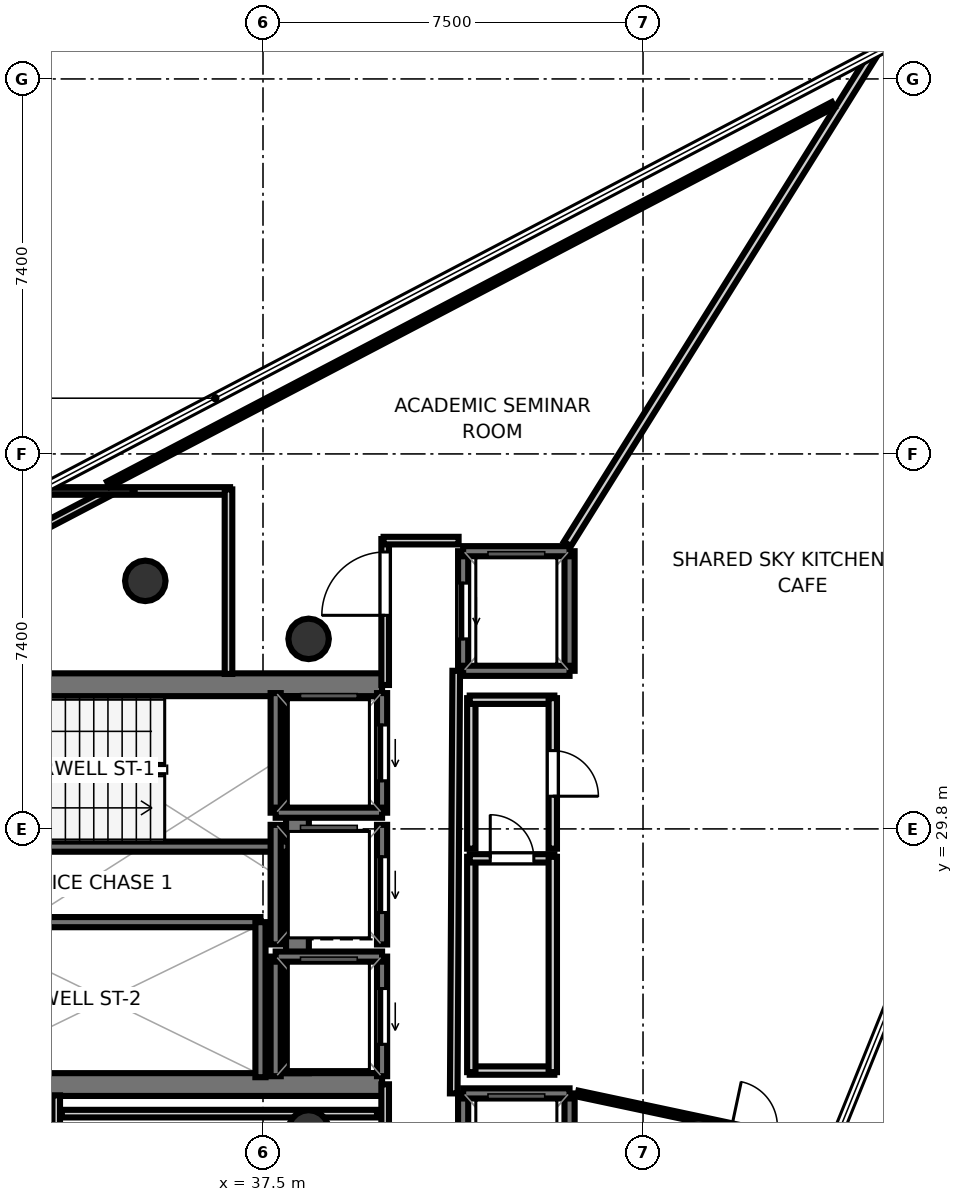
"""IFC4 building model, lengths in metres.
Left out: names, types, materials, properties, quantities, classifications, styles, units other than length and angle.
Written with IfcOpenShell. Run it as: python <this file> out.ifc"""

import sys

from ifc_helpers import new_model, si_unit, direction, frame, frame_2d, origin, origin_2d, place, context, subcontext, project, spatial, rectangle, hollow_circle, extrude, element, fill, save


model = new_model("IFC4")
c1 = context("Model", 3, precision=1e-05, world=origin(), true_north=direction((0.0, 1.0)))
c2 = subcontext(c1, "Body", "Model", "MODEL_VIEW")
j1 = project(units=[si_unit("LENGTHUNIT", "METRE"), si_unit("PLANEANGLEUNIT", "RADIAN")], contexts=[c1])
p1 = place(None, origin())
s1 = spatial("IfcSite", under=j1, at=p1, CompositionType="ELEMENT")
p2 = place(p1, origin())
s2 = spatial("IfcBuilding", under=s1, at=p2, CompositionType="ELEMENT")
p3 = place(p2, frame((0.0, 0.0, 351.8)))
s3 = spatial("IfcBuildingStorey", under=s2, at=p3, CompositionType="ELEMENT", Elevation=351.8)
p4 = place(p3, frame((29.33, 32.645, 0.0), z_axis=(0.0, 0.0, 1.0), x_axis=(1.0, 0.0, 0.0)))
e1 = element("IfcWall", 1, at=p4, inside=s3, PredefinedType="SHEAR", context=c2, shape_type="SweptSolid", body=[
    extrude(rectangle(XDim=10.52, YDim=0.45, at=frame_2d((5.26, 0.0))), origin(), (0.0, 0.0, 1.0), 4.3),
])
p5 = place(p4, frame((0.895, 0.0, 0.0)))
e2 = element("IfcOpeningElement", 2, at=p5, cuts=e1, PredefinedType="OPENING", context=c2, shape_type="SweptSolid", body=[
    extrude(rectangle(XDim=1.25, YDim=2.15, at=frame_2d((0.625, 1.075))), frame((0.0, 0.235, 0.0), z_axis=(0.0, -1.0, 0.0), x_axis=(1.0, 0.0, 0.0)), (0.0, 0.0, 1.0), 0.47),
])
p6 = place(p3, frame((29.33, 24.755, 0.0), z_axis=(0.0, 0.0, 1.0), x_axis=(1.0, 0.0, 0.0)))
e3 = element("IfcWall", 3, at=p6, inside=s3, PredefinedType="SHEAR", context=c2, shape_type="SweptSolid", body=[
    extrude(rectangle(XDim=10.52, YDim=0.45, at=frame_2d((5.26, 0.0))), origin(), (0.0, 0.0, 1.0), 4.3),
])
p7 = place(p6, frame((0.695, 0.0, 0.0)))
e4 = element("IfcOpeningElement", 4, at=p7, cuts=e3, PredefinedType="OPENING", context=c2, shape_type="SweptSolid", body=[
    extrude(rectangle(XDim=1.25, YDim=2.15, at=frame_2d((0.625, 1.075))), frame((0.0, 0.235, 0.0), z_axis=(0.0, -1.0, 0.0), x_axis=(1.0, 0.0, 0.0)), (0.0, 0.0, 1.0), 0.47),
])
p8 = place(p3, frame((38.18, 24.98, 0.0), z_axis=(0.0, 0.0, 1.0), x_axis=(0.0, 1.0, 0.0)))
e5 = element("IfcWall", 5, at=p8, inside=s3, PredefinedType="SHEAR", context=c2, shape_type="SweptSolid", body=[
    extrude(rectangle(XDim=7.44, YDim=0.45, at=frame_2d((3.72, 0.0))), origin(), (0.0, 0.0, 1.0), 4.3),
])
for number, where, z_axis, x_axis in (
    (6, (38.4, 33.55, 0.0), (0.0, 0.0, 1.0), (1.0, 0.0, 0.0)),
    (7, (38.4, 23.85, 0.0), (0.0, 0.0, 1.0), (1.0, 0.0, 0.0)),
    (8, (35.177, 34.695, 0.0), (0.0, 0.0, 1.0), (1.0, 0.0, 0.0)),
    (9, (46.095, 23.691, 0.0), (0.0, 0.0, 1.0), (1.0, 0.0, 0.0)),
):
    element("IfcColumn", number, at=place(p3, frame(where, z_axis=z_axis, x_axis=x_axis)), inside=s3, PredefinedType="COLUMN", context=c2, shape_type="SweptSolid", body=[
        extrude(hollow_circle(Radius=0.4, WallThickness=0.022, at=origin_2d()), origin(), (0.0, 0.0, 1.0), 4.5),
    ])
p9 = place(p3, frame((29.7, 29.45, 0.0), z_axis=(0.0, 0.0, 1.0), x_axis=(1.0, 0.0, 0.0)))
e10 = element("IfcWall", 10, at=p9, inside=s3, PredefinedType="SOLIDWALL", context=c2, shape_type="SweptSolid", body=[
    extrude(rectangle(XDim=8.3, YDim=0.2, at=frame_2d((4.15, 0.0))), origin(), (0.0, 0.0, 1.0), 4.3),
])
p10 = place(p3, frame((29.7, 27.96, 0.0), z_axis=(0.0, 0.0, 1.0), x_axis=(1.0, 0.0, 0.0)))
e11 = element("IfcWall", 11, at=p10, inside=s3, PredefinedType="SOLIDWALL", context=c2, shape_type="SweptSolid", body=[
    extrude(rectangle(XDim=7.75, YDim=0.2, at=frame_2d((3.875, 0.0))), origin(), (0.0, 0.0, 1.0), 4.3),
])
p11 = place(p3, frame((37.45, 24.9, 0.0), z_axis=(0.0, 0.0, 1.0), x_axis=(0.0, 1.0, 0.0)))
e12 = element("IfcWall", 12, at=p11, inside=s3, PredefinedType="SOLIDWALL", context=c2, shape_type="SweptSolid", body=[
    extrude(rectangle(XDim=3.06, YDim=0.2, at=frame_2d((1.53, 0.0))), origin(), (0.0, 0.0, 1.0), 4.3),
])
p12 = place(p3, frame((39.85, 30.12, 0.0), z_axis=(0.0, 0.0, 1.0), x_axis=(0.0, 1.0, 0.0)))
e13 = element("IfcWall", 13, at=p12, inside=s3, PredefinedType="SOLIDWALL", context=c2, shape_type="SweptSolid", body=[
    extrude(rectangle(XDim=2.36, YDim=0.2, at=frame_2d((1.18, 0.0))), origin(), (0.0, 0.0, 1.0), 4.3),
])
p13 = place(p12, frame((0.63, 0.0, 0.0)))
e14 = element("IfcOpeningElement", 14, at=p13, cuts=e13, PredefinedType="OPENING", context=c2, shape_type="SweptSolid", body=[
    extrude(rectangle(XDim=1.1, YDim=2.15, at=frame_2d((0.55, 1.075))), frame((0.0, 0.11, 0.0), z_axis=(0.0, -1.0, 0.0), x_axis=(1.0, 0.0, 0.0)), (0.0, 0.0, 1.0), 0.22),
])
p14 = place(p3, frame((37.75, 30.12, 0.0), z_axis=(0.0, 0.0, 1.0), x_axis=(0.0, 1.0, 0.0)))
e15 = element("IfcWall", 15, at=p14, inside=s3, PredefinedType="SOLIDWALL", context=c2, shape_type="SweptSolid", body=[
    extrude(rectangle(XDim=2.36, YDim=0.2, at=frame_2d((1.18, 0.0))), origin(), (0.0, 0.0, 1.0), 4.3),
])
p15 = place(p3, frame((37.75, 30.12, 0.0), z_axis=(0.0, 0.0, 1.0), x_axis=(1.0, 0.0, 0.0)))
e16 = element("IfcWall", 16, at=p15, inside=s3, PredefinedType="SOLIDWALL", context=c2, shape_type="SweptSolid", body=[
    extrude(rectangle(XDim=2.1, YDim=0.2, at=frame_2d((1.05, 0.0))), origin(), (0.0, 0.0, 1.0), 4.3),
])
p16 = place(p3, frame((39.85, 24.92, 0.0), z_axis=(0.0, 0.0, 1.0), x_axis=(0.0, 1.0, 0.0)))
e17 = element("IfcWall", 17, at=p16, inside=s3, PredefinedType="SOLIDWALL", context=c2, shape_type="SweptSolid", body=[
    extrude(rectangle(XDim=2.36, YDim=0.2, at=frame_2d((1.18, 0.0))), origin(), (0.0, 0.0, 1.0), 4.3),
])
p17 = place(p16, frame((0.63, 0.0, 0.0)))
e18 = element("IfcOpeningElement", 18, at=p17, cuts=e17, PredefinedType="OPENING", context=c2, shape_type="SweptSolid", body=[
    extrude(rectangle(XDim=1.1, YDim=2.15, at=frame_2d((0.55, 1.075))), frame((0.0, 0.11, 0.0), z_axis=(0.0, -1.0, 0.0), x_axis=(1.0, 0.0, 0.0)), (0.0, 0.0, 1.0), 0.22),
])
p18 = place(p3, frame((37.75, 24.92, 0.0), z_axis=(0.0, 0.0, 1.0), x_axis=(0.0, 1.0, 0.0)))
e19 = element("IfcWall", 19, at=p18, inside=s3, PredefinedType="SOLIDWALL", context=c2, shape_type="SweptSolid", body=[
    extrude(rectangle(XDim=2.36, YDim=0.2, at=frame_2d((1.18, 0.0))), origin(), (0.0, 0.0, 1.0), 4.3),
])
p19 = place(p3, frame((37.75, 27.28, 0.0), z_axis=(0.0, 0.0, 1.0), x_axis=(1.0, 0.0, 0.0)))
e20 = element("IfcWall", 20, at=p19, inside=s3, PredefinedType="SOLIDWALL", context=c2, shape_type="SweptSolid", body=[
    extrude(rectangle(XDim=2.1, YDim=0.2, at=frame_2d((1.05, 0.0))), origin(), (0.0, 0.0, 1.0), 4.3),
])
p20 = place(p3, frame((39.85, 27.52, 0.0), z_axis=(0.0, 0.0, 1.0), x_axis=(0.0, 1.0, 0.0)))
e21 = element("IfcWall", 21, at=p20, inside=s3, PredefinedType="SOLIDWALL", context=c2, shape_type="SweptSolid", body=[
    extrude(rectangle(XDim=2.36, YDim=0.2, at=frame_2d((1.18, 0.0))), origin(), (0.0, 0.0, 1.0), 4.3),
])
p21 = place(p20, frame((0.63, 0.0, 0.0)))
e22 = element("IfcOpeningElement", 22, at=p21, cuts=e21, PredefinedType="OPENING", context=c2, shape_type="SweptSolid", body=[
    extrude(rectangle(XDim=1.1, YDim=2.15, at=frame_2d((0.55, 1.075))), frame((0.0, 0.11, 0.0), z_axis=(0.0, -1.0, 0.0), x_axis=(1.0, 0.0, 0.0)), (0.0, 0.0, 1.0), 0.22),
])
p22 = place(p3, frame((37.75, 27.52, 0.0), z_axis=(0.0, 0.0, 1.0), x_axis=(0.0, 1.0, 0.0)))
e23 = element("IfcWall", 23, at=p22, inside=s3, PredefinedType="SOLIDWALL", context=c2, shape_type="SweptSolid", body=[
    extrude(rectangle(XDim=2.36, YDim=0.2, at=frame_2d((1.18, 0.0))), origin(), (0.0, 0.0, 1.0), 4.3),
])
p23 = place(p3, frame((43.55, 22.22, 0.0), z_axis=(0.0, 0.0, 1.0), x_axis=(0.0, 1.0, 0.0)))
e24 = element("IfcWall", 24, at=p23, inside=s3, PredefinedType="SOLIDWALL", context=c2, shape_type="SweptSolid", body=[
    extrude(rectangle(XDim=2.36, YDim=0.2, at=frame_2d((1.18, 0.0))), origin(), (0.0, 0.0, 1.0), 4.3),
])
p24 = place(p3, frame((41.45, 22.22, 0.0), z_axis=(0.0, 0.0, 1.0), x_axis=(0.0, 1.0, 0.0)))
e25 = element("IfcWall", 25, at=p24, inside=s3, PredefinedType="SOLIDWALL", context=c2, shape_type="SweptSolid", body=[
    extrude(rectangle(XDim=2.36, YDim=0.2, at=frame_2d((1.18, 0.0))), origin(), (0.0, 0.0, 1.0), 4.3),
])
p25 = place(p24, frame((0.63, 0.0, 0.0)))
e26 = element("IfcOpeningElement", 26, at=p25, cuts=e25, PredefinedType="OPENING", context=c2, shape_type="SweptSolid", body=[
    extrude(rectangle(XDim=1.1, YDim=2.15, at=frame_2d((0.55, 1.075))), frame((0.0, 0.11, 0.0), z_axis=(0.0, -1.0, 0.0), x_axis=(1.0, 0.0, 0.0)), (0.0, 0.0, 1.0), 0.22),
])
p26 = place(p3, frame((41.45, 24.58, 0.0), z_axis=(0.0, 0.0, 1.0), x_axis=(1.0, 0.0, 0.0)))
e27 = element("IfcWall", 27, at=p26, inside=s3, PredefinedType="SOLIDWALL", context=c2, shape_type="SweptSolid", body=[
    extrude(rectangle(XDim=2.1, YDim=0.2, at=frame_2d((1.05, 0.0))), origin(), (0.0, 0.0, 1.0), 4.3),
])
p27 = place(p3, frame((43.55, 32.92, 0.0), z_axis=(0.0, 0.0, 1.0), x_axis=(0.0, 1.0, 0.0)))
e28 = element("IfcWall", 28, at=p27, inside=s3, PredefinedType="SOLIDWALL", context=c2, shape_type="SweptSolid", body=[
    extrude(rectangle(XDim=2.36, YDim=0.2, at=frame_2d((1.18, 0.0))), origin(), (0.0, 0.0, 1.0), 4.3),
])
p28 = place(p3, frame((41.45, 32.92, 0.0), z_axis=(0.0, 0.0, 1.0), x_axis=(0.0, 1.0, 0.0)))
e29 = element("IfcWall", 29, at=p28, inside=s3, PredefinedType="SOLIDWALL", context=c2, shape_type="SweptSolid", body=[
    extrude(rectangle(XDim=2.36, YDim=0.2, at=frame_2d((1.18, 0.0))), origin(), (0.0, 0.0, 1.0), 4.3),
])
p29 = place(p28, frame((0.63, 0.0, 0.0)))
e30 = element("IfcOpeningElement", 30, at=p29, cuts=e29, PredefinedType="OPENING", context=c2, shape_type="SweptSolid", body=[
    extrude(rectangle(XDim=1.1, YDim=2.15, at=frame_2d((0.55, 1.075))), frame((0.0, 0.11, 0.0), z_axis=(0.0, -1.0, 0.0), x_axis=(1.0, 0.0, 0.0)), (0.0, 0.0, 1.0), 0.22),
])
for number, where, z_axis, x_axis in (
    (31, (41.45, 35.28, 0.0), (0.0, 0.0, 1.0), (1.0, 0.0, 0.0)),
    (32, (41.45, 32.92, 0.0), (0.0, 0.0, 1.0), (1.0, 0.0, 0.0)),
):
    element("IfcWall", number, at=place(p3, frame(where, z_axis=z_axis, x_axis=x_axis)), inside=s3, PredefinedType="SOLIDWALL", context=c2, shape_type="SweptSolid", body=[
        extrude(rectangle(XDim=2.1, YDim=0.2, at=frame_2d((1.05, 0.0))), origin(), (0.0, 0.0, 1.0), 4.3),
    ])
p30 = place(p3, frame((29.764, 33.985, 0.0), z_axis=(0.0, 0.0, 1.0), x_axis=(0.885903695569, 0.46386920805, 0.0)))
e33 = element("IfcWall", 33, at=p30, inside=s3, PredefinedType="PARTITIONING", context=c2, shape_type="SweptSolid", body=[
    extrude(rectangle(XDim=5.363, YDim=0.15, at=frame_2d((2.682, 0.0))), origin(), (0.0, 0.0, 1.0), 2.82),
])
p31 = place(p3, frame((33.042, 36.469, 0.0), z_axis=(0.0, 0.0, 1.0), x_axis=(1.0, 0.0, 0.0)))
e34 = element("IfcWall", 34, at=p31, inside=s3, PredefinedType="PARTITIONING", context=c2, shape_type="SweptSolid", body=[
    extrude(rectangle(XDim=3.808, YDim=0.15, at=frame_2d((1.904, 0.0))), origin(), (0.0, 0.0, 1.0), 2.82),
])
p32 = place(p3, frame((36.819, 36.5, 0.0), z_axis=(0.0, 0.0, 1.0), x_axis=(0.0, -1.0, 0.0)))
e35 = element("IfcWall", 35, at=p32, inside=s3, PredefinedType="PARTITIONING", context=c2, shape_type="SweptSolid", body=[
    extrude(rectangle(XDim=3.642, YDim=0.15, at=frame_2d((1.821, 0.0))), origin(), (0.0, 0.0, 1.0), 2.82),
])
p33 = place(p3, frame((33.419, 24.542, 0.0), z_axis=(0.0, 0.0, 1.0), x_axis=(0.0, -1.0, 0.0)))
e36 = element("IfcWall", 36, at=p33, inside=s3, PredefinedType="PARTITIONING", context=c2, shape_type="SweptSolid", body=[
    extrude(rectangle(XDim=2.692, YDim=0.15, at=frame_2d((1.346, 0.0))), origin(), (0.0, 0.0, 1.0), 2.82),
])
p34 = place(p3, frame((39.911, 23.28, 0.0), z_axis=(0.0, 0.0, 1.0), x_axis=(0.0, 1.0, 0.0)))
e37 = element("IfcWall", 37, at=p34, inside=s3, PredefinedType="PARTITIONING", context=c2, shape_type="SweptSolid", body=[
    extrude(rectangle(XDim=1.48, YDim=0.15, at=frame_2d((0.74, 0.0))), origin(), (0.0, 0.0, 1.0), 2.82),
])
p35 = place(p3, frame((39.911, 32.64, 0.0), z_axis=(0.0, 0.0, 1.0), x_axis=(0.0, 1.0, 0.0)))
e38 = element("IfcWall", 38, at=p35, inside=s3, PredefinedType="PARTITIONING", context=c2, shape_type="SweptSolid", body=[
    extrude(rectangle(XDim=2.88, YDim=0.15, at=frame_2d((1.44, 0.0))), origin(), (0.0, 0.0, 1.0), 2.82),
])
p36 = place(p35, frame((1.375, 0.0, 0.0)))
e39 = element("IfcOpeningElement", 39, at=p36, cuts=e38, PredefinedType="OPENING", context=c2, shape_type="SweptSolid", body=[
    extrude(rectangle(XDim=1.25, YDim=2.2, at=frame_2d((0.625, 1.1))), frame((0.0, 0.085, 0.0), z_axis=(0.0, -1.0, 0.0), x_axis=(1.0, 0.0, 0.0)), (0.0, 0.0, 1.0), 0.17),
])
p37 = place(p3, frame((39.88, 35.489, 0.0), z_axis=(0.0, 0.0, 1.0), x_axis=(1.0, 0.0, 0.0)))
e40 = element("IfcWall", 40, at=p37, inside=s3, PredefinedType="PARTITIONING", context=c2, shape_type="SweptSolid", body=[
    extrude(rectangle(XDim=1.48, YDim=0.15, at=frame_2d((0.74, 0.0))), origin(), (0.0, 0.0, 1.0), 2.82),
])
p38 = place(p3, frame((41.313, 32.92, 0.0), z_axis=(0.0, 0.0, 1.0), x_axis=(-0.005942518022, -0.999982343084, 0.0)))
e41 = element("IfcWall", 41, at=p38, inside=s3, PredefinedType="PARTITIONING", context=c2, shape_type="SweptSolid", body=[
    extrude(rectangle(XDim=8.34, YDim=0.15, at=frame_2d((4.17, 0.0))), origin(), (0.0, 0.0, 1.0), 2.82),
])
p39 = place(p3, frame((43.25, 25.031, 0.0), z_axis=(0.0, 0.0, 1.0), x_axis=(-1.0, 0.0, 0.0)))
e42 = element("IfcWall", 42, at=p39, inside=s3, PredefinedType="PLUMBINGWALL", context=c2, shape_type="SweptSolid", body=[
    extrude(rectangle(XDim=1.67, YDim=0.165, at=frame_2d((0.835, 0.0))), origin(), (0.0, 0.0, 1.0), 2.82),
])
p40 = place(p3, frame((41.611, 25.0, 0.0), z_axis=(0.0, 0.0, 1.0), x_axis=(0.0, 1.0, 0.0)))
e43 = element("IfcWall", 43, at=p40, inside=s3, PredefinedType="PLUMBINGWALL", context=c2, shape_type="SweptSolid", body=[
    extrude(rectangle(XDim=4.25, YDim=0.165, at=frame_2d((2.125, 0.0))), origin(), (0.0, 0.0, 1.0), 2.82),
])
p41 = place(p3, frame((41.58, 29.219, 0.0), z_axis=(0.0, 0.0, 1.0), x_axis=(1.0, 0.0, 0.0)))
e44 = element("IfcWall", 44, at=p41, inside=s3, PredefinedType="PLUMBINGWALL", context=c2, shape_type="SweptSolid", body=[
    extrude(rectangle(XDim=1.67, YDim=0.165, at=frame_2d((0.835, 0.0))), origin(), (0.0, 0.0, 1.0), 2.82),
])
p42 = place(p41, frame((0.405, 0.0, 0.0)))
e45 = element("IfcOpeningElement", 45, at=p42, cuts=e44, PredefinedType="OPENING", context=c2, shape_type="SweptSolid", body=[
    extrude(rectangle(XDim=0.86, YDim=2.05, at=frame_2d((0.43, 1.025))), frame((0.0, 0.093, 0.0), z_axis=(0.0, -1.0, 0.0), x_axis=(1.0, 0.0, 0.0)), (0.0, 0.0, 1.0), 0.185),
])
p43 = place(p3, frame((43.219, 29.25, 0.0), z_axis=(0.0, 0.0, 1.0), x_axis=(0.0, -1.0, 0.0)))
e46 = element("IfcWall", 46, at=p43, inside=s3, PredefinedType="PLUMBINGWALL", context=c2, shape_type="SweptSolid", body=[
    extrude(rectangle(XDim=4.25, YDim=0.165, at=frame_2d((2.125, 0.0))), origin(), (0.0, 0.0, 1.0), 2.82),
])
p44 = place(p3, frame((41.611, 29.41, 0.0), z_axis=(0.0, 0.0, 1.0), x_axis=(0.0, 1.0, 0.0)))
e47 = element("IfcWall", 47, at=p44, inside=s3, PredefinedType="PLUMBINGWALL", context=c2, shape_type="SweptSolid", body=[
    extrude(rectangle(XDim=2.97, YDim=0.165, at=frame_2d((1.485, 0.0))), origin(), (0.0, 0.0, 1.0), 2.82),
])
p45 = place(p3, frame((41.58, 32.349, 0.0), z_axis=(0.0, 0.0, 1.0), x_axis=(1.0, 0.0, 0.0)))
e48 = element("IfcWall", 48, at=p45, inside=s3, PredefinedType="PLUMBINGWALL", context=c2, shape_type="SweptSolid", body=[
    extrude(rectangle(XDim=1.67, YDim=0.165, at=frame_2d((0.835, 0.0))), origin(), (0.0, 0.0, 1.0), 2.82),
])
p46 = place(p3, frame((43.219, 32.38, 0.0), z_axis=(0.0, 0.0, 1.0), x_axis=(0.0, -1.0, 0.0)))
e49 = element("IfcWall", 49, at=p46, inside=s3, PredefinedType="PLUMBINGWALL", context=c2, shape_type="SweptSolid", body=[
    extrude(rectangle(XDim=2.97, YDim=0.165, at=frame_2d((1.485, 0.0))), origin(), (0.0, 0.0, 1.0), 2.82),
])
p47 = place(p46, frame((1.035, 0.0, 0.0)))
e50 = element("IfcOpeningElement", 50, at=p47, cuts=e49, PredefinedType="OPENING", context=c2, shape_type="SweptSolid", body=[
    extrude(rectangle(XDim=0.9, YDim=2.1, at=frame_2d((0.45, 1.05))), frame((0.0, 0.093, 0.0), z_axis=(0.0, -1.0, 0.0), x_axis=(1.0, 0.0, 0.0)), (0.0, 0.0, 1.0), 0.185),
])
p48 = place(p3, frame((39.75, 24.181, 0.0), z_axis=(0.0, 0.0, 1.0), x_axis=(-1.0, 0.0, 0.0)))
e51 = element("IfcWall", 51, at=p48, inside=s3, PredefinedType="PARTITIONING", context=c2, shape_type="SweptSolid", body=[
    extrude(rectangle(XDim=6.22, YDim=0.15, at=frame_2d((3.11, 0.0))), origin(), (0.0, 0.0, 1.0), 2.82),
])
p49 = place(p3, frame((43.713, 24.576, 0.0), z_axis=(0.0, 0.0, 1.0), x_axis=(0.978143673995, -0.207930163816, 0.0)))
e52 = element("IfcWall", 52, at=p49, inside=s3, PredefinedType="PARTITIONING", context=c2, shape_type="SweptSolid", body=[
    extrude(rectangle(XDim=5.152, YDim=0.12, at=frame_2d((2.576, 0.0))), origin(), (0.0, 0.0, 1.0), 2.82),
])
p50 = place(p49, frame((3.106, 0.0, 0.0)))
e53 = element("IfcOpeningElement", 53, at=p50, cuts=e52, PredefinedType="OPENING", context=c2, shape_type="SweptSolid", body=[
    extrude(rectangle(XDim=0.9, YDim=2.1, at=frame_2d((0.45, 1.05))), frame((0.0, 0.07, 0.0), z_axis=(0.0, -1.0, 0.0), x_axis=(1.0, 0.0, 0.0)), (0.0, 0.0, 1.0), 0.14),
])
p51 = place(p3, frame((43.508, 35.424, 0.0), z_axis=(0.0, 0.0, 1.0), x_axis=(0.529920277959, 0.848047462709, 0.0)))
e54 = element("IfcWall", 54, at=p51, inside=s3, PredefinedType="PLUMBINGWALL", context=c2, shape_type="SweptSolid", body=[
    extrude(rectangle(XDim=11.438, YDim=0.165, at=frame_2d((5.719, 0.0))), origin(), (0.0, 0.0, 1.0), 2.82),
])
p52 = place(p3, frame((34.448, 36.601, 0.0), z_axis=(0.0, 0.0, 1.0), x_axis=(0.885897810841, 0.46388044661, 0.0)))
e55 = element("IfcWall", 55, at=p52, inside=s3, PredefinedType="PARTITIONING", context=c2, shape_type="SweptSolid", body=[
    extrude(rectangle(XDim=16.148, YDim=0.12, at=frame_2d((8.074, 0.0))), origin(), (0.0, 0.0, 1.0), 2.82),
])
p53 = place(p13, origin())
e56 = element("IfcDoor", 56, at=p53, inside=s3, OperationType="SLIDING_TO_LEFT", PredefinedType="DOOR", context=c2, shape_type="SweptSolid", body=[
    extrude(rectangle(XDim=1.1, YDim=2.15, at=frame_2d((0.55, 1.075))), frame((0.0, 0.025, 0.0), z_axis=(0.0, -1.0, 0.0), x_axis=(1.0, 0.0, 0.0)), (0.0, 0.0, 1.0), 0.05),
])
fill(e14, e56)
p54 = place(p17, origin())
e57 = element("IfcDoor", 57, at=p54, inside=s3, OperationType="SLIDING_TO_LEFT", PredefinedType="DOOR", context=c2, shape_type="SweptSolid", body=[
    extrude(rectangle(XDim=1.1, YDim=2.15, at=frame_2d((0.55, 1.075))), frame((0.0, 0.025, 0.0), z_axis=(0.0, -1.0, 0.0), x_axis=(1.0, 0.0, 0.0)), (0.0, 0.0, 1.0), 0.05),
])
fill(e18, e57)
p55 = place(p21, origin())
e58 = element("IfcDoor", 58, at=p55, inside=s3, OperationType="SLIDING_TO_LEFT", PredefinedType="DOOR", context=c2, shape_type="SweptSolid", body=[
    extrude(rectangle(XDim=1.1, YDim=2.15, at=frame_2d((0.55, 1.075))), frame((0.0, 0.025, 0.0), z_axis=(0.0, -1.0, 0.0), x_axis=(1.0, 0.0, 0.0)), (0.0, 0.0, 1.0), 0.05),
])
fill(e22, e58)
p56 = place(p29, origin())
e59 = element("IfcDoor", 59, at=p56, inside=s3, OperationType="SLIDING_TO_LEFT", PredefinedType="DOOR", context=c2, shape_type="SweptSolid", body=[
    extrude(rectangle(XDim=1.1, YDim=2.15, at=frame_2d((0.55, 1.075))), frame((0.0, 0.025, 0.0), z_axis=(0.0, -1.0, 0.0), x_axis=(1.0, 0.0, 0.0)), (0.0, 0.0, 1.0), 0.05),
])
fill(e30, e59)
p57 = place(p36, origin())
e60 = element("IfcDoor", 60, at=p57, inside=s3, OperationType="SINGLE_SWING_LEFT", PredefinedType="DOOR", context=c2, shape_type="SweptSolid", body=[
    extrude(rectangle(XDim=1.25, YDim=2.2, at=frame_2d((0.625, 1.1))), frame((0.0, 0.025, 0.0), z_axis=(0.0, -1.0, 0.0), x_axis=(1.0, 0.0, 0.0)), (0.0, 0.0, 1.0), 0.05),
])
fill(e39, e60)
p58 = place(p47, origin())
e61 = element("IfcDoor", 61, at=p58, inside=s3, OperationType="SINGLE_SWING_RIGHT", PredefinedType="DOOR", context=c2, shape_type="SweptSolid", body=[
    extrude(rectangle(XDim=0.9, YDim=2.1, at=frame_2d((0.45, 1.05))), frame((0.0, 0.025, 0.0), z_axis=(0.0, -1.0, 0.0), x_axis=(1.0, 0.0, 0.0)), (0.0, 0.0, 1.0), 0.05),
])
fill(e50, e61)
p59 = place(p42, origin())
e62 = element("IfcDoor", 62, at=p59, inside=s3, OperationType="SINGLE_SWING_LEFT", PredefinedType="DOOR", context=c2, shape_type="SweptSolid", body=[
    extrude(rectangle(XDim=0.86, YDim=2.05, at=frame_2d((0.43, 1.025))), frame((0.0, 0.025, 0.0), z_axis=(0.0, -1.0, 0.0), x_axis=(1.0, 0.0, 0.0)), (0.0, 0.0, 1.0), 0.05),
])
fill(e45, e62)
save(model, sys.argv[1])
